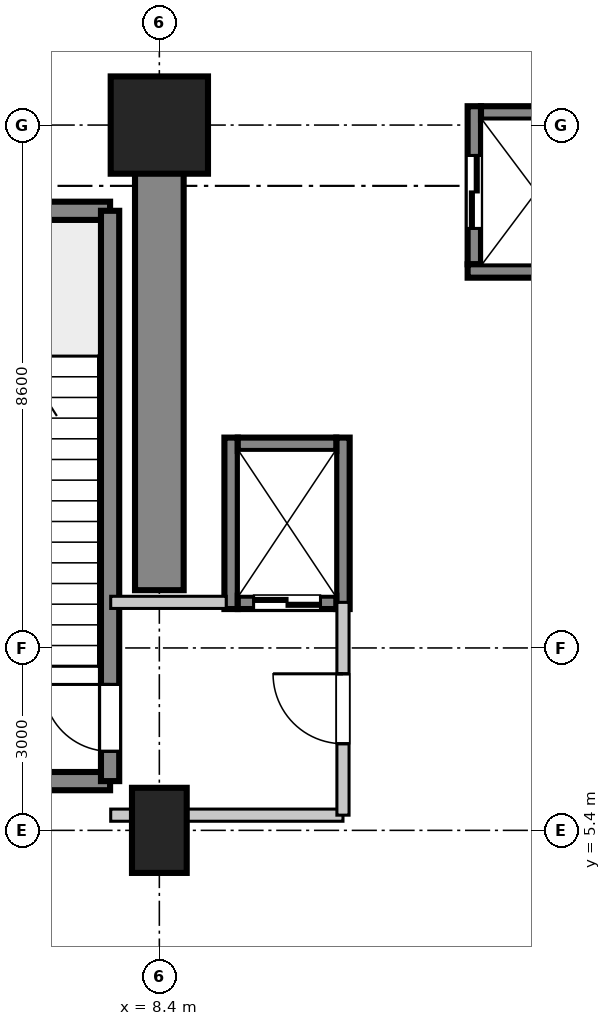
"""IFC4 building model, lengths in metres.
Left out: names, types, materials, properties, quantities, classifications, styles, units other than length and angle.
Written with IfcOpenShell. Run it as: python <this file> out.ifc"""

import sys

from ifc_helpers import new_model, si_unit, direction, frame, frame_2d, origin, origin_2d, place, context, subcontext, project, spatial, rectangle, extrude, source, transform, mapped, element, fill, save


model = new_model("IFC4")
c1 = context("Model", 3, precision=1e-05, world=origin(), true_north=direction((0.0, 1.0)))
c2 = subcontext(c1, "Body", "Model", "MODEL_VIEW")
j1 = project(units=[si_unit("LENGTHUNIT", "METRE"), si_unit("PLANEANGLEUNIT", "RADIAN")], contexts=[c1])
p1 = place(None, origin())
s1 = spatial("IfcSite", under=j1, at=p1, CompositionType="ELEMENT")
p2 = place(p1, origin())
s2 = spatial("IfcBuilding", under=s1, at=p2, CompositionType="ELEMENT")
p3 = place(p2, frame((0.0, 0.0, -5.4)))
s3 = spatial("IfcBuildingStorey", under=s2, at=p3, CompositionType="ELEMENT", Elevation=-5.4)
m1 = source(origin(), c2, "Body", "SweptSolid", [
    extrude(rectangle(XDim=0.9, YDim=1.4, at=origin_2d()), origin(), (0.0, 0.0, 1.0), 5.355),
])
p4 = place(p3, frame((8.4, 5.4, 0.0), z_axis=(0.0, 0.0, 1.0), x_axis=(1.0, 0.0, 0.0)))
e1 = element("IfcColumn", 1, at=p4, inside=s3, PredefinedType="PILASTER", context=c2, shape_type="MappedRepresentation", body=[
    mapped(m1, transform((0.0, 0.0, 0.0), scale=1.0)),
])
m2 = source(origin(), c2, "Body", "SweptSolid", [
    extrude(rectangle(XDim=1.6, YDim=1.6, at=origin_2d()), origin(), (0.0, 0.0, 1.0), 5.355),
])
p5 = place(p3, frame((8.4, 17.0, 0.0), z_axis=(0.0, 0.0, 1.0), x_axis=(1.0, 0.0, 0.0)))
e2 = element("IfcColumn", 2, at=p5, inside=s3, PredefinedType="COLUMN", context=c2, shape_type="MappedRepresentation", body=[
    mapped(m2, transform((0.0, 0.0, 0.0), scale=1.0)),
])
m3 = source(origin(), c2, "Body", "SweptSolid", [
    extrude(rectangle(XDim=7.65, YDim=0.8, at=frame_2d((3.825, 0.0))), origin(), (0.0, 0.0, 1.0), 5.08),
])
p6 = place(p3, frame((8.4, 9.35, 0.0), z_axis=(0.0, 0.0, 1.0), x_axis=(0.0, 1.0, 0.0)))
e3 = element("IfcWall", 3, at=p6, inside=s3, PredefinedType="SHEAR", context=c2, shape_type="MappedRepresentation", body=[
    mapped(m3, transform((0.0, 0.0, 0.0), scale=1.0)),
])
m4 = source(origin(), c2, "Body", "SweptSolid", [
    extrude(rectangle(XDim=3.98, YDim=0.3, at=frame_2d((1.99, 0.0))), origin(), (0.0, 0.0, 1.0), 5.08),
])
for number, where, z_axis, x_axis in (
    (4, (3.61, 6.21, 0.0), (0.0, 0.0, 1.0), (1.0, 0.0, 0.0)),
    (5, (3.61, 15.59, 0.0), (0.0, 0.0, 1.0), (1.0, 0.0, 0.0)),
):
    element("IfcWall", number, at=place(p3, frame(where, z_axis=z_axis, x_axis=x_axis)), inside=s3, PredefinedType="SHEAR", context=c2, shape_type="MappedRepresentation", body=[
        mapped(m4, transform((0.0, 0.0, 0.0), scale=1.0)),
    ])
m5 = source(origin(), c2, "Body", "SweptSolid", [
    extrude(rectangle(XDim=9.38, YDim=0.3, at=frame_2d((4.69, 0.0))), origin(), (0.0, 0.0, 1.0), 5.08),
])
p7 = place(p3, frame((7.59, 6.21, 0.0), z_axis=(0.0, 0.0, 1.0), x_axis=(0.0, 1.0, 0.0)))
e6 = element("IfcWall", 6, at=p7, inside=s3, PredefinedType="SHEAR", context=c2, shape_type="MappedRepresentation", body=[
    mapped(m5, transform((0.0, 0.0, 0.0), scale=1.0)),
])
p8 = place(p7, frame((0.49, 0.0, 0.0)))
e7 = element("IfcOpeningElement", 7, at=p8, cuts=e6, PredefinedType="OPENING", context=c2, shape_type="SweptSolid", body=[
    extrude(rectangle(XDim=1.1, YDim=2.15, at=frame_2d((0.55, 1.075))), frame((0.0, 0.16, 0.0), z_axis=(0.0, -1.0, 0.0), x_axis=(1.0, 0.0, 0.0)), (0.0, 0.0, 1.0), 0.32),
])
m6 = source(origin(), c2, "Body", "SweptSolid", [
    extrude(rectangle(XDim=2.82, YDim=0.22, at=frame_2d((1.41, 0.0))), origin(), (0.0, 0.0, 1.0), 5.08),
])
for number, where, z_axis, x_axis in (
    (8, (9.58, 9.04, 0.0), (0.0, 0.0, 1.0), (0.0, 1.0, 0.0)),
    (9, (11.42, 9.04, 0.0), (0.0, 0.0, 1.0), (0.0, 1.0, 0.0)),
):
    element("IfcWall", number, at=place(p3, frame(where, z_axis=z_axis, x_axis=x_axis)), inside=s3, PredefinedType="SHEAR", context=c2, shape_type="MappedRepresentation", body=[
        mapped(m6, transform((0.0, 0.0, 0.0), scale=1.0)),
    ])
m7 = source(origin(), c2, "Body", "SweptSolid", [
    extrude(rectangle(XDim=1.62, YDim=0.22, at=frame_2d((0.81, 0.0))), origin(), (0.0, 0.0, 1.0), 5.08),
])
p9 = place(p3, frame((9.69, 9.15, 0.0), z_axis=(0.0, 0.0, 1.0), x_axis=(1.0, 0.0, 0.0)))
e10 = element("IfcWall", 10, at=p9, inside=s3, PredefinedType="SHEAR", context=c2, shape_type="MappedRepresentation", body=[
    mapped(m7, transform((0.0, 0.0, 0.0), scale=1.0)),
])
p10 = place(p9, frame((0.26, 0.0, 0.0)))
e11 = element("IfcOpeningElement", 11, at=p10, cuts=e10, PredefinedType="OPENING", context=c2, shape_type="SweptSolid", body=[
    extrude(rectangle(XDim=1.1, YDim=2.2, at=frame_2d((0.55, 1.1))), frame((0.0, 0.12, 0.0), z_axis=(0.0, -1.0, 0.0), x_axis=(1.0, 0.0, 0.0)), (0.0, 0.0, 1.0), 0.24),
])
p11 = place(p3, frame((9.69, 11.75, 0.0), z_axis=(0.0, 0.0, 1.0), x_axis=(1.0, 0.0, 0.0)))
e12 = element("IfcWall", 12, at=p11, inside=s3, PredefinedType="SHEAR", context=c2, shape_type="MappedRepresentation", body=[
    mapped(m7, transform((0.0, 0.0, 0.0), scale=1.0)),
])
m8 = source(origin(), c2, "Body", "SweptSolid", [
    extrude(rectangle(XDim=2.6, YDim=0.22, at=frame_2d((1.3, 0.0))), origin(), (0.0, 0.0, 1.0), 5.08),
])
p12 = place(p3, frame((13.58, 14.71, 0.0), z_axis=(0.0, 0.0, 1.0), x_axis=(0.0, 1.0, 0.0)))
e13 = element("IfcWall", 13, at=p12, inside=s3, PredefinedType="SHEAR", context=c2, shape_type="MappedRepresentation", body=[
    mapped(m8, transform((0.0, 0.0, 0.0), scale=1.0)),
])
p13 = place(p12, frame((0.59, 0.0, 0.0)))
e14 = element("IfcOpeningElement", 14, at=p13, cuts=e13, PredefinedType="OPENING", context=c2, shape_type="SweptSolid", body=[
    extrude(rectangle(XDim=1.2, YDim=2.2, at=frame_2d((0.6, 1.1))), frame((0.0, 0.12, 0.0), z_axis=(0.0, -1.0, 0.0), x_axis=(1.0, 0.0, 0.0)), (0.0, 0.0, 1.0), 0.24),
])
m9 = source(origin(), c2, "Body", "SweptSolid", [
    extrude(rectangle(XDim=2.18, YDim=0.22, at=frame_2d((1.09, 0.0))), origin(), (0.0, 0.0, 1.0), 5.08),
])
p14 = place(p3, frame((13.47, 14.6, 0.0), z_axis=(0.0, 0.0, 1.0), x_axis=(1.0, 0.0, 0.0)))
e15 = element("IfcWall", 15, at=p14, inside=s3, PredefinedType="SHEAR", context=c2, shape_type="MappedRepresentation", body=[
    mapped(m9, transform((0.0, 0.0, 0.0), scale=1.0)),
])
m10 = source(origin(), c2, "Body", "SweptSolid", [
    extrude(rectangle(XDim=1.82, YDim=0.22, at=frame_2d((0.91, 0.0))), origin(), (0.0, 0.0, 1.0), 5.08),
])
p15 = place(p3, frame((13.69, 17.2, 0.0), z_axis=(0.0, 0.0, 1.0), x_axis=(1.0, 0.0, 0.0)))
e16 = element("IfcWall", 16, at=p15, inside=s3, PredefinedType="SHEAR", context=c2, shape_type="MappedRepresentation", body=[
    mapped(m10, transform((0.0, 0.0, 0.0), scale=1.0)),
])
m11 = source(origin(), c2, "Body", "SweptSolid", [
    extrude(rectangle(XDim=3.82, YDim=0.2, at=frame_2d((1.91, 0.0))), origin(), (0.0, 0.0, 1.0), 3.4),
])
p16 = place(p3, frame((7.6, 5.65, 0.0), z_axis=(0.0, 0.0, 1.0), x_axis=(1.0, 0.0, 0.0)))
e17 = element("IfcWall", 17, at=p16, inside=s3, PredefinedType="PARTITIONING", context=c2, shape_type="MappedRepresentation", body=[
    mapped(m11, transform((0.0, 0.0, 0.0), scale=1.0)),
])
m12 = source(origin(), c2, "Body", "SweptSolid", [
    extrude(rectangle(XDim=1.9, YDim=0.2, at=frame_2d((0.95, 0.0))), origin(), (0.0, 0.0, 1.0), 3.4),
])
p17 = place(p3, frame((7.6, 9.15, 0.0), z_axis=(0.0, 0.0, 1.0), x_axis=(1.0, 0.0, 0.0)))
e18 = element("IfcWall", 18, at=p17, inside=s3, PredefinedType="PARTITIONING", context=c2, shape_type="MappedRepresentation", body=[
    mapped(m12, transform((0.0, 0.0, 0.0), scale=1.0)),
])
m13 = source(origin(), c2, "Body", "SweptSolid", [
    extrude(rectangle(XDim=3.5, YDim=0.2, at=frame_2d((1.75, 0.0))), origin(), (0.0, 0.0, 1.0), 3.4),
])
p18 = place(p3, frame((11.42, 5.65, 0.0), z_axis=(0.0, 0.0, 1.0), x_axis=(0.0, 1.0, 0.0)))
e19 = element("IfcWall", 19, at=p18, inside=s3, PredefinedType="PARTITIONING", context=c2, shape_type="MappedRepresentation", body=[
    mapped(m13, transform((0.0, 0.0, 0.0), scale=1.0)),
])
p19 = place(p18, frame((1.175, 0.0, 0.0)))
e20 = element("IfcOpeningElement", 20, at=p19, cuts=e19, PredefinedType="OPENING", context=c2, shape_type="SweptSolid", body=[
    extrude(rectangle(XDim=1.15, YDim=2.15, at=frame_2d((0.575, 1.075))), frame((0.0, 0.11, 0.0), z_axis=(0.0, -1.0, 0.0), x_axis=(1.0, 0.0, 0.0)), (0.0, 0.0, 1.0), 0.22),
])
m14 = source(origin(), c2, "Body", "SweptSolid", [
    extrude(rectangle(XDim=1.1, YDim=2.15, at=frame_2d((0.55, 1.075))), frame((0.0, 0.025, 0.0), z_axis=(0.0, -1.0, 0.0), x_axis=(1.0, 0.0, 0.0)), (0.0, 0.0, 1.0), 0.05),
])
p20 = place(p8, origin())
e21 = element("IfcDoor", 21, at=p20, inside=s3, OperationType="SINGLE_SWING_RIGHT", PredefinedType="DOOR", context=c2, shape_type="MappedRepresentation", body=[
    mapped(m14, transform((0.0, 0.0, 0.0), scale=1.0)),
])
fill(e7, e21)
m15 = source(origin(), c2, "Body", "SweptSolid", [
    extrude(rectangle(XDim=1.1, YDim=2.2, at=frame_2d((0.55, 1.1))), frame((0.0, 0.025, 0.0), z_axis=(0.0, -1.0, 0.0), x_axis=(1.0, 0.0, 0.0)), (0.0, 0.0, 1.0), 0.05),
])
p21 = place(p10, frame((1.1, 0.0, 0.0), z_axis=(0.0, 0.0, 1.0), x_axis=(-1.0, 0.0, 0.0)))
e22 = element("IfcDoor", 22, at=p21, inside=s3, OperationType="DOUBLE_DOOR_SLIDING", PredefinedType="DOOR", context=c2, shape_type="MappedRepresentation", body=[
    mapped(m15, transform((0.0, 0.0, 0.0), scale=1.0)),
])
fill(e11, e22)
m16 = source(origin(), c2, "Body", "SweptSolid", [
    extrude(rectangle(XDim=1.2, YDim=2.2, at=frame_2d((0.6, 1.1))), frame((0.0, 0.025, 0.0), z_axis=(0.0, -1.0, 0.0), x_axis=(1.0, 0.0, 0.0)), (0.0, 0.0, 1.0), 0.05),
])
p22 = place(p13, origin())
e23 = element("IfcDoor", 23, at=p22, inside=s3, OperationType="DOUBLE_DOOR_SLIDING", PredefinedType="DOOR", context=c2, shape_type="MappedRepresentation", body=[
    mapped(m16, transform((0.0, 0.0, 0.0), scale=1.0)),
])
fill(e14, e23)
m17 = source(origin(), c2, "Body", "SweptSolid", [
    extrude(rectangle(XDim=1.15, YDim=2.15, at=frame_2d((0.575, 1.075))), frame((0.0, 0.025, 0.0), z_axis=(0.0, -1.0, 0.0), x_axis=(1.0, 0.0, 0.0)), (0.0, 0.0, 1.0), 0.05),
])
p23 = place(p19, frame((1.15, 0.0, 0.0), z_axis=(0.0, 0.0, 1.0), x_axis=(-1.0, 0.0, 0.0)))
e24 = element("IfcDoor", 24, at=p23, inside=s3, OperationType="SINGLE_SWING_RIGHT", PredefinedType="DOOR", context=c2, shape_type="MappedRepresentation", body=[
    mapped(m17, transform((0.0, 0.0, 0.0), scale=1.0)),
])
fill(e20, e24)
save(model, sys.argv[1])
